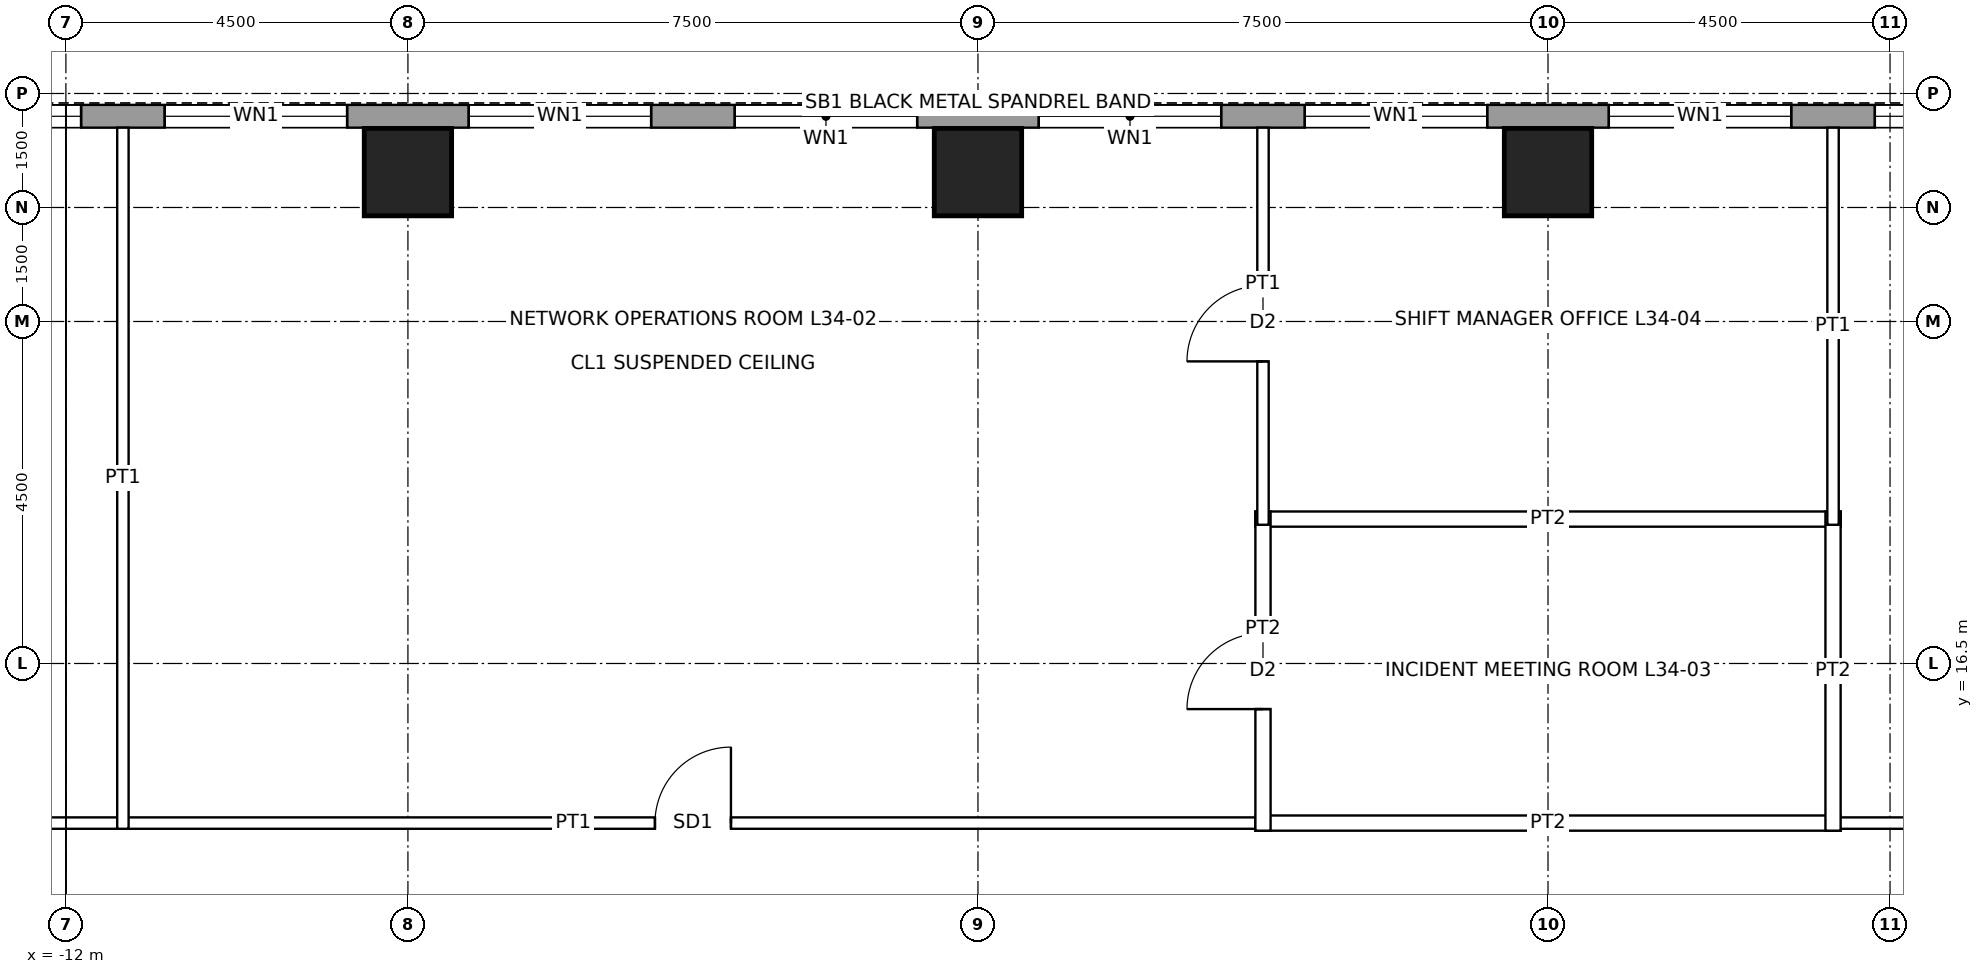
"""IFC4 building model, lengths in metres.
Left out: names, types, materials, properties, quantities, classifications, styles, units other than length and angle.
Written with IfcOpenShell. Run it as: python <this file> out.ifc"""

import sys

from ifc_helpers import new_model, si_unit, direction, frame, frame_2d, origin, origin_2d, place, context, subcontext, project, spatial, rectangle, hollow_rectangle, extrude, element, fill, save


model = new_model("IFC4")
c1 = context("Model", 3, precision=1e-05, world=origin(), true_north=direction((0.0, 1.0)))
c2 = subcontext(c1, "Body", "Model", "MODEL_VIEW")
j1 = project(units=[si_unit("LENGTHUNIT", "METRE"), si_unit("PLANEANGLEUNIT", "RADIAN")], contexts=[c1])
p1 = place(None, origin())
s1 = spatial("IfcSite", under=j1, at=p1, CompositionType="ELEMENT")
p2 = place(p1, origin())
s2 = spatial("IfcBuilding", under=s1, at=p2, CompositionType="ELEMENT")
p3 = place(p2, frame((0.0, 0.0, 167.4)))
s3 = spatial("IfcBuildingStorey", under=s2, at=p3, CompositionType="ELEMENT", Elevation=167.4)
for number, where, z_axis, x_axis in (
    (1, (-7.5, 22.965, 0.0), (0.0, 0.0, 1.0), (1.0, 0.0, 0.0)),
    (2, (0.0, 22.965, 0.0), (0.0, 0.0, 1.0), (1.0, 0.0, 0.0)),
    (3, (7.5, 22.965, 0.0), (0.0, 0.0, 1.0), (1.0, 0.0, 0.0)),
):
    element("IfcColumn", number, at=place(p3, frame(where, z_axis=z_axis, x_axis=x_axis)), inside=s3, PredefinedType="COLUMN", context=c2, shape_type="SweptSolid", body=[
        extrude(hollow_rectangle(XDim=1.15, YDim=1.15, WallThickness=0.075, at=origin_2d()), origin(), (0.0, 0.0, 1.0), 4.5),
    ])
p4 = place(p3, frame((-16.2, 23.7, 0.0), z_axis=(0.0, 0.0, 1.0), x_axis=(1.0, 0.0, 0.0)))
e4 = element("IfcWall", 4, at=p4, inside=s3, PredefinedType="SOLIDWALL", context=c2, shape_type="SweptSolid", body=[
    extrude(rectangle(XDim=32.4, YDim=0.3, at=frame_2d((16.2, 0.0))), origin(), (0.0, 0.0, 1.0), 4.25),
])
p5 = place(p4, frame((2.0, 0.0, 1.0)))
e5 = element("IfcOpeningElement", 5, at=p5, cuts=e4, PredefinedType="OPENING", context=c2, shape_type="SweptSolid", body=[
    extrude(rectangle(XDim=2.4, YDim=1.2, at=frame_2d((1.2, 0.6))), frame((0.0, 0.16, 0.0), z_axis=(0.0, -1.0, 0.0), x_axis=(1.0, 0.0, 0.0)), (0.0, 0.0, 1.0), 0.32),
])
p6 = place(p4, frame((5.5, 0.0, 1.0)))
e6 = element("IfcOpeningElement", 6, at=p6, cuts=e4, PredefinedType="OPENING", context=c2, shape_type="SweptSolid", body=[
    extrude(rectangle(XDim=2.4, YDim=1.2, at=frame_2d((1.2, 0.6))), frame((0.0, 0.16, 0.0), z_axis=(0.0, -1.0, 0.0), x_axis=(1.0, 0.0, 0.0)), (0.0, 0.0, 1.0), 0.32),
])
p7 = place(p4, frame((9.5, 0.0, 1.0)))
e7 = element("IfcOpeningElement", 7, at=p7, cuts=e4, PredefinedType="OPENING", context=c2, shape_type="SweptSolid", body=[
    extrude(rectangle(XDim=2.4, YDim=1.2, at=frame_2d((1.2, 0.6))), frame((0.0, 0.16, 0.0), z_axis=(0.0, -1.0, 0.0), x_axis=(1.0, 0.0, 0.0)), (0.0, 0.0, 1.0), 0.32),
])
p8 = place(p4, frame((13.0, 0.0, 1.0)))
e8 = element("IfcOpeningElement", 8, at=p8, cuts=e4, PredefinedType="OPENING", context=c2, shape_type="SweptSolid", body=[
    extrude(rectangle(XDim=2.4, YDim=1.2, at=frame_2d((1.2, 0.6))), frame((0.0, 0.16, 0.0), z_axis=(0.0, -1.0, 0.0), x_axis=(1.0, 0.0, 0.0)), (0.0, 0.0, 1.0), 0.32),
])
p9 = place(p4, frame((17.0, 0.0, 1.0)))
e9 = element("IfcOpeningElement", 9, at=p9, cuts=e4, PredefinedType="OPENING", context=c2, shape_type="SweptSolid", body=[
    extrude(rectangle(XDim=2.4, YDim=1.2, at=frame_2d((1.2, 0.6))), frame((0.0, 0.16, 0.0), z_axis=(0.0, -1.0, 0.0), x_axis=(1.0, 0.0, 0.0)), (0.0, 0.0, 1.0), 0.32),
])
p10 = place(p4, frame((20.5, 0.0, 1.0)))
e10 = element("IfcOpeningElement", 10, at=p10, cuts=e4, PredefinedType="OPENING", context=c2, shape_type="SweptSolid", body=[
    extrude(rectangle(XDim=2.4, YDim=1.2, at=frame_2d((1.2, 0.6))), frame((0.0, 0.16, 0.0), z_axis=(0.0, -1.0, 0.0), x_axis=(1.0, 0.0, 0.0)), (0.0, 0.0, 1.0), 0.32),
])
p11 = place(p4, frame((24.5, 0.0, 1.0)))
e11 = element("IfcOpeningElement", 11, at=p11, cuts=e4, PredefinedType="OPENING", context=c2, shape_type="SweptSolid", body=[
    extrude(rectangle(XDim=2.4, YDim=1.2, at=frame_2d((1.2, 0.6))), frame((0.0, 0.16, 0.0), z_axis=(0.0, -1.0, 0.0), x_axis=(1.0, 0.0, 0.0)), (0.0, 0.0, 1.0), 0.32),
])
p12 = place(p4, frame((28.0, 0.0, 1.0)))
e12 = element("IfcOpeningElement", 12, at=p12, cuts=e4, PredefinedType="OPENING", context=c2, shape_type="SweptSolid", body=[
    extrude(rectangle(XDim=2.4, YDim=1.2, at=frame_2d((1.2, 0.6))), frame((0.0, 0.16, 0.0), z_axis=(0.0, -1.0, 0.0), x_axis=(1.0, 0.0, 0.0)), (0.0, 0.0, 1.0), 0.32),
])
p13 = place(p3, frame((-14.475, 14.4, 0.0), z_axis=(0.0, 0.0, 1.0), x_axis=(1.0, 0.0, 0.0)))
e13 = element("IfcWall", 13, at=p13, inside=s3, PredefinedType="PARTITIONING", context=c2, shape_type="SweptSolid", body=[
    extrude(rectangle(XDim=18.3, YDim=0.15, at=frame_2d((9.15, 0.0))), origin(), (0.0, 0.0, 1.0), 4.25),
])
p14 = place(p13, frame((10.225, 0.0, 0.0)))
e14 = element("IfcOpeningElement", 14, at=p14, cuts=e13, PredefinedType="OPENING", context=c2, shape_type="SweptSolid", body=[
    extrude(rectangle(XDim=1.0, YDim=2.4, at=frame_2d((0.5, 1.2))), frame((0.0, 0.085, 0.0), z_axis=(0.0, -1.0, 0.0), x_axis=(1.0, 0.0, 0.0)), (0.0, 0.0, 1.0), 0.17),
])
p15 = place(p13, frame((1.15, 0.0, 0.0)))
e15 = element("IfcOpeningElement", 15, at=p15, cuts=e13, PredefinedType="OPENING", context=c2, shape_type="SweptSolid", body=[
    extrude(rectangle(XDim=1.0, YDim=2.1, at=frame_2d((0.5, 1.05))), frame((0.0, 0.085, 0.0), z_axis=(0.0, -1.0, 0.0), x_axis=(1.0, 0.0, 0.0)), (0.0, 0.0, 1.0), 0.17),
])
p16 = place(p3, frame((3.65, 14.4, 0.0), z_axis=(0.0, 0.0, 1.0), x_axis=(1.0, 0.0, 0.0)))
e16 = element("IfcWall", 16, at=p16, inside=s3, PredefinedType="PARTITIONING", context=c2, shape_type="SweptSolid", body=[
    extrude(rectangle(XDim=7.7, YDim=0.2, at=frame_2d((3.85, 0.0))), origin(), (0.0, 0.0, 1.0), 4.25),
])
p17 = place(p3, frame((11.175, 14.4, 0.0), z_axis=(0.0, 0.0, 1.0), x_axis=(1.0, 0.0, 0.0)))
e17 = element("IfcWall", 17, at=p17, inside=s3, PredefinedType="PARTITIONING", context=c2, shape_type="SweptSolid", body=[
    extrude(rectangle(XDim=3.3, YDim=0.15, at=frame_2d((1.65, 0.0))), origin(), (0.0, 0.0, 1.0), 4.25),
])
p18 = place(p17, frame((1.15, 0.0, 0.0)))
e18 = element("IfcOpeningElement", 18, at=p18, cuts=e17, PredefinedType="OPENING", context=c2, shape_type="SweptSolid", body=[
    extrude(rectangle(XDim=1.0, YDim=2.1, at=frame_2d((0.5, 1.05))), frame((0.0, 0.085, 0.0), z_axis=(0.0, -1.0, 0.0), x_axis=(1.0, 0.0, 0.0)), (0.0, 0.0, 1.0), 0.17),
])
p19 = place(p3, frame((3.65, 18.4, 0.0), z_axis=(0.0, 0.0, 1.0), x_axis=(1.0, 0.0, 0.0)))
e19 = element("IfcWall", 19, at=p19, inside=s3, PredefinedType="PARTITIONING", context=c2, shape_type="SweptSolid", body=[
    extrude(rectangle(XDim=7.7, YDim=0.2, at=frame_2d((3.85, 0.0))), origin(), (0.0, 0.0, 1.0), 4.25),
])
p20 = place(p3, frame((-11.25, 14.325, 0.0), z_axis=(0.0, 0.0, 1.0), x_axis=(0.0, 1.0, 0.0)))
e20 = element("IfcWall", 20, at=p20, inside=s3, PredefinedType="PARTITIONING", context=c2, shape_type="SweptSolid", body=[
    extrude(rectangle(XDim=9.225, YDim=0.15, at=frame_2d((4.613, 0.0))), origin(), (0.0, 0.0, 1.0), 3.409),
])
p21 = place(p3, frame((3.75, 14.3, 0.0), z_axis=(0.0, 0.0, 1.0), x_axis=(0.0, 1.0, 0.0)))
e21 = element("IfcWall", 21, at=p21, inside=s3, PredefinedType="PARTITIONING", context=c2, shape_type="SweptSolid", body=[
    extrude(rectangle(XDim=4.2, YDim=0.2, at=frame_2d((2.1, 0.0))), origin(), (0.0, 0.0, 1.0), 3.409),
])
p22 = place(p21, frame((1.6, 0.0, 0.0)))
e22 = element("IfcOpeningElement", 22, at=p22, cuts=e21, PredefinedType="OPENING", context=c2, shape_type="SweptSolid", body=[
    extrude(rectangle(XDim=1.0, YDim=2.1, at=frame_2d((0.5, 1.05))), frame((0.0, 0.11, 0.0), z_axis=(0.0, -1.0, 0.0), x_axis=(1.0, 0.0, 0.0)), (0.0, 0.0, 1.0), 0.22),
])
p23 = place(p3, frame((3.75, 18.325, 0.0), z_axis=(0.0, 0.0, 1.0), x_axis=(0.0, 1.0, 0.0)))
e23 = element("IfcWall", 23, at=p23, inside=s3, PredefinedType="PARTITIONING", context=c2, shape_type="SweptSolid", body=[
    extrude(rectangle(XDim=5.225, YDim=0.15, at=frame_2d((2.613, 0.0))), origin(), (0.0, 0.0, 1.0), 3.409),
])
p24 = place(p23, frame((2.15, 0.0, 0.0)))
e24 = element("IfcOpeningElement", 24, at=p24, cuts=e23, PredefinedType="OPENING", context=c2, shape_type="SweptSolid", body=[
    extrude(rectangle(XDim=1.0, YDim=2.1, at=frame_2d((0.5, 1.05))), frame((0.0, 0.085, 0.0), z_axis=(0.0, -1.0, 0.0), x_axis=(1.0, 0.0, 0.0)), (0.0, 0.0, 1.0), 0.17),
])
p25 = place(p3, frame((11.25, 14.3, 0.0), z_axis=(0.0, 0.0, 1.0), x_axis=(0.0, 1.0, 0.0)))
e25 = element("IfcWall", 25, at=p25, inside=s3, PredefinedType="PARTITIONING", context=c2, shape_type="SweptSolid", body=[
    extrude(rectangle(XDim=4.2, YDim=0.2, at=frame_2d((2.1, 0.0))), origin(), (0.0, 0.0, 1.0), 3.409),
])
p26 = place(p3, frame((11.25, 18.325, 0.0), z_axis=(0.0, 0.0, 1.0), x_axis=(0.0, 1.0, 0.0)))
e26 = element("IfcWall", 26, at=p26, inside=s3, PredefinedType="PARTITIONING", context=c2, shape_type="SweptSolid", body=[
    extrude(rectangle(XDim=5.225, YDim=0.15, at=frame_2d((2.613, 0.0))), origin(), (0.0, 0.0, 1.0), 3.409),
])
p27 = place(p5, origin())
e27 = element("IfcWindow", 27, at=p27, inside=s3, PartitioningType="SINGLE_PANEL", PredefinedType="WINDOW", context=c2, shape_type="SweptSolid", body=[
    extrude(rectangle(XDim=2.4, YDim=1.2, at=frame_2d((1.2, 0.6))), frame((0.0, 0.03, 0.0), z_axis=(0.0, -1.0, 0.0), x_axis=(1.0, 0.0, 0.0)), (0.0, 0.0, 1.0), 0.06),
])
fill(e5, e27)
p28 = place(p6, origin())
e28 = element("IfcWindow", 28, at=p28, inside=s3, PartitioningType="SINGLE_PANEL", PredefinedType="WINDOW", context=c2, shape_type="SweptSolid", body=[
    extrude(rectangle(XDim=2.4, YDim=1.2, at=frame_2d((1.2, 0.6))), frame((0.0, 0.03, 0.0), z_axis=(0.0, -1.0, 0.0), x_axis=(1.0, 0.0, 0.0)), (0.0, 0.0, 1.0), 0.06),
])
fill(e6, e28)
p29 = place(p7, origin())
e29 = element("IfcWindow", 29, at=p29, inside=s3, PartitioningType="SINGLE_PANEL", PredefinedType="WINDOW", context=c2, shape_type="SweptSolid", body=[
    extrude(rectangle(XDim=2.4, YDim=1.2, at=frame_2d((1.2, 0.6))), frame((0.0, 0.03, 0.0), z_axis=(0.0, -1.0, 0.0), x_axis=(1.0, 0.0, 0.0)), (0.0, 0.0, 1.0), 0.06),
])
fill(e7, e29)
p30 = place(p8, origin())
e30 = element("IfcWindow", 30, at=p30, inside=s3, PartitioningType="SINGLE_PANEL", PredefinedType="WINDOW", context=c2, shape_type="SweptSolid", body=[
    extrude(rectangle(XDim=2.4, YDim=1.2, at=frame_2d((1.2, 0.6))), frame((0.0, 0.03, 0.0), z_axis=(0.0, -1.0, 0.0), x_axis=(1.0, 0.0, 0.0)), (0.0, 0.0, 1.0), 0.06),
])
fill(e8, e30)
p31 = place(p9, origin())
e31 = element("IfcWindow", 31, at=p31, inside=s3, PartitioningType="SINGLE_PANEL", PredefinedType="WINDOW", context=c2, shape_type="SweptSolid", body=[
    extrude(rectangle(XDim=2.4, YDim=1.2, at=frame_2d((1.2, 0.6))), frame((0.0, 0.03, 0.0), z_axis=(0.0, -1.0, 0.0), x_axis=(1.0, 0.0, 0.0)), (0.0, 0.0, 1.0), 0.06),
])
fill(e9, e31)
p32 = place(p10, origin())
e32 = element("IfcWindow", 32, at=p32, inside=s3, PartitioningType="SINGLE_PANEL", PredefinedType="WINDOW", context=c2, shape_type="SweptSolid", body=[
    extrude(rectangle(XDim=2.4, YDim=1.2, at=frame_2d((1.2, 0.6))), frame((0.0, 0.03, 0.0), z_axis=(0.0, -1.0, 0.0), x_axis=(1.0, 0.0, 0.0)), (0.0, 0.0, 1.0), 0.06),
])
fill(e10, e32)
p33 = place(p11, origin())
e33 = element("IfcWindow", 33, at=p33, inside=s3, PartitioningType="SINGLE_PANEL", PredefinedType="WINDOW", context=c2, shape_type="SweptSolid", body=[
    extrude(rectangle(XDim=2.4, YDim=1.2, at=frame_2d((1.2, 0.6))), frame((0.0, 0.03, 0.0), z_axis=(0.0, -1.0, 0.0), x_axis=(1.0, 0.0, 0.0)), (0.0, 0.0, 1.0), 0.06),
])
fill(e11, e33)
p34 = place(p12, origin())
e34 = element("IfcWindow", 34, at=p34, inside=s3, PartitioningType="SINGLE_PANEL", PredefinedType="WINDOW", context=c2, shape_type="SweptSolid", body=[
    extrude(rectangle(XDim=2.4, YDim=1.2, at=frame_2d((1.2, 0.6))), frame((0.0, 0.03, 0.0), z_axis=(0.0, -1.0, 0.0), x_axis=(1.0, 0.0, 0.0)), (0.0, 0.0, 1.0), 0.06),
])
fill(e12, e34)
p35 = place(p14, origin())
e35 = element("IfcDoor", 35, at=p35, inside=s3, OperationType="SINGLE_SWING_RIGHT", PredefinedType="DOOR", context=c2, shape_type="SweptSolid", body=[
    extrude(rectangle(XDim=1.0, YDim=2.4, at=frame_2d((0.5, 1.2))), frame((0.0, 0.025, 0.0), z_axis=(0.0, -1.0, 0.0), x_axis=(1.0, 0.0, 0.0)), (0.0, 0.0, 1.0), 0.05),
])
fill(e14, e35)
p36 = place(p22, origin())
e36 = element("IfcDoor", 36, at=p36, inside=s3, OperationType="SINGLE_SWING_LEFT", PredefinedType="DOOR", context=c2, shape_type="SweptSolid", body=[
    extrude(rectangle(XDim=1.0, YDim=2.1, at=frame_2d((0.5, 1.05))), frame((0.0, 0.025, 0.0), z_axis=(0.0, -1.0, 0.0), x_axis=(1.0, 0.0, 0.0)), (0.0, 0.0, 1.0), 0.05),
])
fill(e22, e36)
p37 = place(p24, origin())
e37 = element("IfcDoor", 37, at=p37, inside=s3, OperationType="SINGLE_SWING_LEFT", PredefinedType="DOOR", context=c2, shape_type="SweptSolid", body=[
    extrude(rectangle(XDim=1.0, YDim=2.1, at=frame_2d((0.5, 1.05))), frame((0.0, 0.025, 0.0), z_axis=(0.0, -1.0, 0.0), x_axis=(1.0, 0.0, 0.0)), (0.0, 0.0, 1.0), 0.05),
])
fill(e24, e37)
save(model, sys.argv[1])
